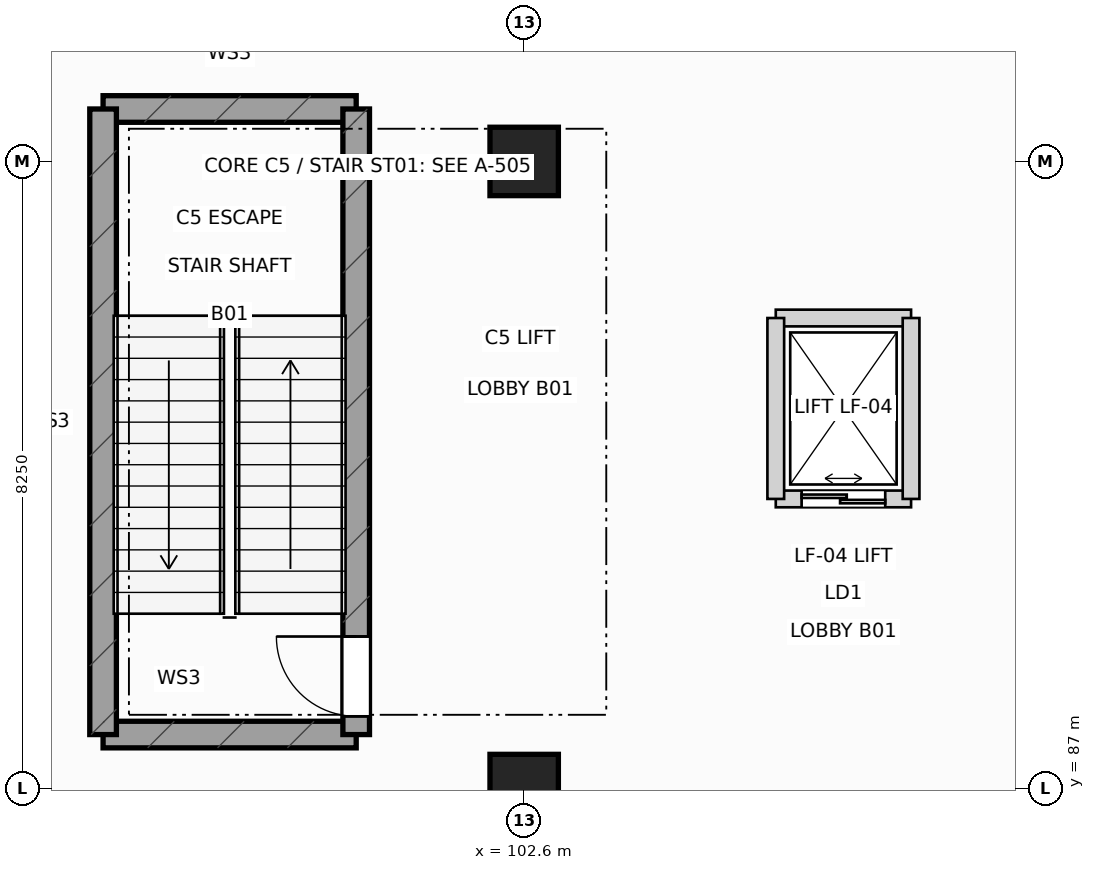
"""IFC4 building model, lengths in metres.
Left out: names, types, materials, properties, quantities, classifications, styles, units other than length and angle.
Written with IfcOpenShell. Run it as: python <this file> out.ifc"""

import sys

from ifc_helpers import new_model, si_unit, direction, frame, frame_2d, origin, origin_2d, place, context, subcontext, project, spatial, rectangle, extrude, element, fill, save


model = new_model("IFC4")
c1 = context("Model", 3, precision=1e-05, world=origin(), true_north=direction((0.0, 1.0)))
c2 = subcontext(c1, "Body", "Model", "MODEL_VIEW")
j1 = project(units=[si_unit("LENGTHUNIT", "METRE"), si_unit("PLANEANGLEUNIT", "RADIAN")], contexts=[c1])
p1 = place(None, origin())
s1 = spatial("IfcSite", under=j1, at=p1, CompositionType="ELEMENT")
p2 = place(p1, origin())
s2 = spatial("IfcBuilding", under=s1, at=p2, CompositionType="ELEMENT")
p3 = place(p2, frame((0.0, 0.0, -5.4)))
s3 = spatial("IfcBuildingStorey", under=s2, at=p3, CompositionType="ELEMENT", Elevation=-5.4)
for number, where, z_axis, x_axis in (
    (1, (102.6, 87.0, 0.0), (0.0, 0.0, 1.0), (1.0, 0.0, 0.0)),
    (2, (102.6, 95.25, 0.0), (0.0, 0.0, 1.0), (1.0, 0.0, 0.0)),
):
    element("IfcColumn", number, at=place(p3, frame(where, z_axis=z_axis, x_axis=x_axis)), inside=s3, PredefinedType="COLUMN", context=c2, shape_type="SweptSolid", body=[
        extrude(rectangle(XDim=0.9, YDim=0.9, at=origin_2d()), origin(), (0.0, 0.0, 1.0), 5.4),
    ])
for number, where, z_axis, x_axis in (
    (3, (97.06, 87.71, 0.0), (0.0, 0.0, 1.0), (1.0, 0.0, 0.0)),
    (4, (97.06, 95.94, 0.0), (0.0, 0.0, 1.0), (1.0, 0.0, 0.0)),
):
    element("IfcWall", number, at=place(p3, frame(where, z_axis=z_axis, x_axis=x_axis)), inside=s3, PredefinedType="SHEAR", context=c2, shape_type="SweptSolid", body=[
        extrude(rectangle(XDim=3.33, YDim=0.35, at=frame_2d((1.665, 0.0))), origin(), (0.0, 0.0, 1.0), 5.08),
    ])
p4 = place(p3, frame((97.06, 87.71, 0.0), z_axis=(0.0, 0.0, 1.0), x_axis=(0.0, 1.0, 0.0)))
e5 = element("IfcWall", 5, at=p4, inside=s3, PredefinedType="SHEAR", context=c2, shape_type="SweptSolid", body=[
    extrude(rectangle(XDim=8.23, YDim=0.35, at=frame_2d((4.115, 0.0))), origin(), (0.0, 0.0, 1.0), 5.08),
])
p5 = place(p3, frame((100.39, 87.71, 0.0), z_axis=(0.0, 0.0, 1.0), x_axis=(0.0, 1.0, 0.0)))
e6 = element("IfcWall", 6, at=p5, inside=s3, PredefinedType="SHEAR", context=c2, shape_type="SweptSolid", body=[
    extrude(rectangle(XDim=8.23, YDim=0.35, at=frame_2d((4.115, 0.0))), origin(), (0.0, 0.0, 1.0), 5.08),
])
p6 = place(p5, frame((0.24, 0.0, 0.0)))
e7 = element("IfcOpeningElement", 7, at=p6, cuts=e6, PredefinedType="OPENING", context=c2, shape_type="SweptSolid", body=[
    extrude(rectangle(XDim=1.05, YDim=2.18, at=frame_2d((0.525, 1.09))), frame((0.0, 0.185, 0.0), z_axis=(0.0, -1.0, 0.0), x_axis=(1.0, 0.0, 0.0)), (0.0, 0.0, 1.0), 0.37),
])
p7 = place(p3, frame((105.91, 90.81, 0.0), z_axis=(0.0, 0.0, 1.0), x_axis=(1.0, 0.0, 0.0)))
e8 = element("IfcWall", 8, at=p7, inside=s3, PredefinedType="PARTITIONING", context=c2, shape_type="SweptSolid", body=[
    extrude(rectangle(XDim=1.78, YDim=0.22, at=frame_2d((0.89, 0.0))), origin(), (0.0, 0.0, 1.0), 5.045),
])
p8 = place(p7, frame((0.34, 0.0, 0.0)))
e9 = element("IfcOpeningElement", 9, at=p8, cuts=e8, PredefinedType="OPENING", context=c2, shape_type="SweptSolid", body=[
    extrude(rectangle(XDim=1.1, YDim=2.18, at=frame_2d((0.55, 1.09))), frame((0.0, 0.12, 0.0), z_axis=(0.0, -1.0, 0.0), x_axis=(1.0, 0.0, 0.0)), (0.0, 0.0, 1.0), 0.24),
])
p9 = place(p3, frame((105.91, 93.19, 0.0), z_axis=(0.0, 0.0, 1.0), x_axis=(1.0, 0.0, 0.0)))
e10 = element("IfcWall", 10, at=p9, inside=s3, PredefinedType="PARTITIONING", context=c2, shape_type="SweptSolid", body=[
    extrude(rectangle(XDim=1.78, YDim=0.22, at=frame_2d((0.89, 0.0))), origin(), (0.0, 0.0, 1.0), 5.045),
])
for number, where, z_axis, x_axis in (
    (11, (105.91, 90.81, 0.0), (0.0, 0.0, 1.0), (0.0, 1.0, 0.0)),
    (12, (107.69, 90.81, 0.0), (0.0, 0.0, 1.0), (0.0, 1.0, 0.0)),
):
    element("IfcWall", number, at=place(p3, frame(where, z_axis=z_axis, x_axis=x_axis)), inside=s3, PredefinedType="PARTITIONING", context=c2, shape_type="SweptSolid", body=[
        extrude(rectangle(XDim=2.38, YDim=0.22, at=frame_2d((1.19, 0.0))), origin(), (0.0, 0.0, 1.0), 5.045),
    ])
p10 = place(p6, origin())
e13 = element("IfcDoor", 13, at=p10, inside=s3, OperationType="SINGLE_SWING_RIGHT", PredefinedType="DOOR", context=c2, shape_type="SweptSolid", body=[
    extrude(rectangle(XDim=1.05, YDim=2.18, at=frame_2d((0.525, 1.09))), frame((0.0, 0.025, 0.0), z_axis=(0.0, -1.0, 0.0), x_axis=(1.0, 0.0, 0.0)), (0.0, 0.0, 1.0), 0.05),
])
fill(e7, e13)
p11 = place(p8, origin())
e14 = element("IfcDoor", 14, at=p11, inside=s3, OperationType="DOUBLE_DOOR_SLIDING", PredefinedType="DOOR", context=c2, shape_type="SweptSolid", body=[
    extrude(rectangle(XDim=1.1, YDim=2.18, at=frame_2d((0.55, 1.09))), frame((0.0, 0.025, 0.0), z_axis=(0.0, -1.0, 0.0), x_axis=(1.0, 0.0, 0.0)), (0.0, 0.0, 1.0), 0.05),
])
fill(e9, e14)
save(model, sys.argv[1])
